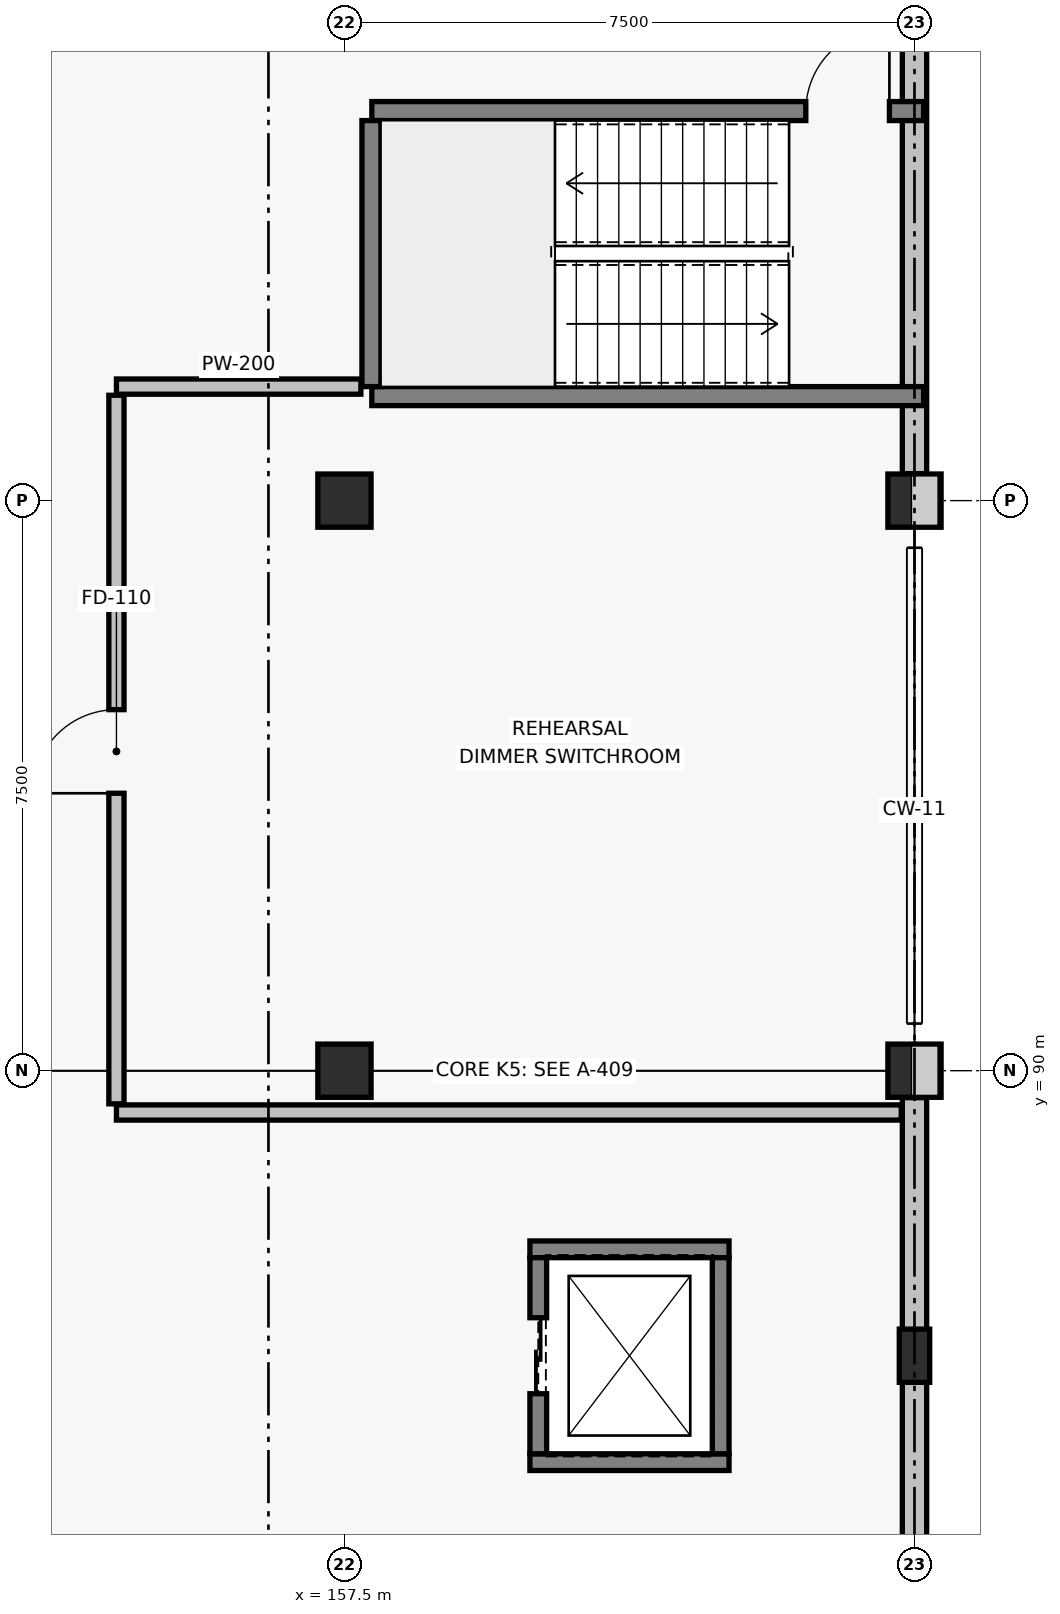
"""IFC4 building model, lengths in metres.
Left out: names, types, materials, properties, quantities, classifications, styles, units other than length and angle.
Written with IfcOpenShell. Run it as: python <this file> out.ifc"""

import sys

from ifc_helpers import new_model, si_unit, direction, frame, frame_2d, origin, origin_2d, place, context, subcontext, project, spatial, rectangle, extrude, element, fill, save


model = new_model("IFC4")
c1 = context("Model", 3, precision=1e-05, world=origin(), true_north=direction((0.0, 1.0)))
c2 = subcontext(c1, "Body", "Model", "MODEL_VIEW")
j1 = project(units=[si_unit("LENGTHUNIT", "METRE"), si_unit("PLANEANGLEUNIT", "RADIAN")], contexts=[c1])
p1 = place(None, origin())
s1 = spatial("IfcSite", under=j1, at=p1, CompositionType="ELEMENT")
p2 = place(p1, origin())
s2 = spatial("IfcBuilding", under=s1, at=p2, CompositionType="ELEMENT")
p3 = place(p2, frame((0.0, 0.0, 4.8)))
s3 = spatial("IfcBuildingStorey", under=s2, at=p3, CompositionType="ELEMENT", Elevation=4.8)
for number, where, z_axis, x_axis in (
    (1, (157.5, 90.0, 0.0), (0.0, 0.0, 1.0), (1.0, 0.0, 0.0)),
    (2, (157.5, 97.5, 0.0), (0.0, 0.0, 1.0), (1.0, 0.0, 0.0)),
    (3, (165.0, 90.0, 0.0), (0.0, 0.0, 1.0), (1.0, 0.0, 0.0)),
    (4, (165.0, 97.5, 0.0), (0.0, 0.0, 1.0), (1.0, 0.0, 0.0)),
):
    element("IfcColumn", number, at=place(p3, frame(where, z_axis=z_axis, x_axis=x_axis)), inside=s3, PredefinedType="COLUMN", context=c2, shape_type="SweptSolid", body=[
        extrude(rectangle(XDim=0.7, YDim=0.7, at=origin_2d()), origin(), (0.0, 0.0, 1.0), 4.2),
    ])
p4 = place(p3, frame((165.0, 86.25, 0.0), z_axis=(0.0, 0.0, 1.0), x_axis=(1.0, 0.0, 0.0)))
e5 = element("IfcColumn", 5, at=p4, inside=s3, PredefinedType="PILASTER", context=c2, shape_type="SweptSolid", body=[
    extrude(rectangle(XDim=0.4, YDim=0.7, at=origin_2d()), origin(), (0.0, 0.0, 1.0), 4.2),
])
p5 = place(p3, frame((165.0, 82.855, 0.0), z_axis=(0.0, 0.0, 1.0), x_axis=(0.0, 1.0, 0.0)))
e6 = element("IfcWall", 6, at=p5, inside=s3, PredefinedType="SOLIDWALL", context=c2, shape_type="SweptSolid", body=[
    extrude(rectangle(XDim=6.79, YDim=0.32, at=frame_2d((3.395, 0.0))), origin(), (0.0, 0.0, 1.0), 3.04),
])
p6 = place(p3, frame((165.0, 97.855, 0.0), z_axis=(0.0, 0.0, 1.0), x_axis=(0.0, 1.0, 0.0)))
e7 = element("IfcWall", 7, at=p6, inside=s3, PredefinedType="SOLIDWALL", context=c2, shape_type="SweptSolid", body=[
    extrude(rectangle(XDim=6.79, YDim=0.32, at=frame_2d((3.395, 0.0))), origin(), (0.0, 0.0, 1.0), 2.84),
])
p7 = place(p3, frame((157.86, 98.875, 0.0), z_axis=(0.0, 0.0, 1.0), x_axis=(1.0, 0.0, 0.0)))
e8 = element("IfcWall", 8, at=p7, inside=s3, PredefinedType="SOLIDWALL", context=c2, shape_type="SweptSolid", body=[
    extrude(rectangle(XDim=7.26, YDim=0.25, at=frame_2d((3.63, 0.0))), origin(), (0.0, 0.0, 1.0), 3.92),
])
p8 = place(p3, frame((157.86, 102.625, 0.0), z_axis=(0.0, 0.0, 1.0), x_axis=(1.0, 0.0, 0.0)))
e9 = element("IfcWall", 9, at=p8, inside=s3, PredefinedType="SOLIDWALL", context=c2, shape_type="SweptSolid", body=[
    extrude(rectangle(XDim=7.26, YDim=0.25, at=frame_2d((3.63, 0.0))), origin(), (0.0, 0.0, 1.0), 3.92),
])
p9 = place(p8, frame((5.71, 0.0, 0.0)))
e10 = element("IfcOpeningElement", 10, at=p9, cuts=e9, PredefinedType="OPENING", context=c2, shape_type="SweptSolid", body=[
    extrude(rectangle(XDim=1.1, YDim=2.15, at=frame_2d((0.55, 1.075))), frame((0.0, 0.135, 0.0), z_axis=(0.0, -1.0, 0.0), x_axis=(1.0, 0.0, 0.0)), (0.0, 0.0, 1.0), 0.27),
])
p10 = place(p3, frame((157.855, 99.0, 0.0), z_axis=(0.0, 0.0, 1.0), x_axis=(0.0, 1.0, 0.0)))
e11 = element("IfcWall", 11, at=p10, inside=s3, PredefinedType="SOLIDWALL", context=c2, shape_type="SweptSolid", body=[
    extrude(rectangle(XDim=3.5, YDim=0.25, at=frame_2d((1.75, 0.0))), origin(), (0.0, 0.0, 1.0), 3.92),
])
for number, where, z_axis, x_axis in (
    (12, (159.94, 84.85, 0.0), (0.0, 0.0, 1.0), (1.0, 0.0, 0.0)),
    (13, (159.94, 87.65, 0.0), (0.0, 0.0, 1.0), (1.0, 0.0, 0.0)),
):
    element("IfcWall", number, at=place(p3, frame(where, z_axis=z_axis, x_axis=x_axis)), inside=s3, PredefinedType="SOLIDWALL", context=c2, shape_type="SweptSolid", body=[
        extrude(rectangle(XDim=2.62, YDim=0.22, at=frame_2d((1.31, 0.0))), origin(), (0.0, 0.0, 1.0), 3.92),
    ])
p11 = place(p3, frame((160.05, 84.96, 0.0), z_axis=(0.0, 0.0, 1.0), x_axis=(0.0, 1.0, 0.0)))
e14 = element("IfcWall", 14, at=p11, inside=s3, PredefinedType="SOLIDWALL", context=c2, shape_type="SweptSolid", body=[
    extrude(rectangle(XDim=2.58, YDim=0.22, at=frame_2d((1.29, 0.0))), origin(), (0.0, 0.0, 1.0), 3.92),
])
p12 = place(p11, frame((0.79, 0.0, 0.0)))
e15 = element("IfcOpeningElement", 15, at=p12, cuts=e14, PredefinedType="OPENING", context=c2, shape_type="SweptSolid", body=[
    extrude(rectangle(XDim=1.0, YDim=2.15, at=frame_2d((0.5, 1.075))), frame((0.0, 0.12, 0.0), z_axis=(0.0, -1.0, 0.0), x_axis=(1.0, 0.0, 0.0)), (0.0, 0.0, 1.0), 0.24),
])
p13 = place(p3, frame((162.45, 84.96, 0.0), z_axis=(0.0, 0.0, 1.0), x_axis=(0.0, 1.0, 0.0)))
e16 = element("IfcWall", 16, at=p13, inside=s3, PredefinedType="SOLIDWALL", context=c2, shape_type="SweptSolid", body=[
    extrude(rectangle(XDim=2.58, YDim=0.22, at=frame_2d((1.29, 0.0))), origin(), (0.0, 0.0, 1.0), 3.92),
])
p14 = place(p3, frame((154.5, 89.45, 0.0), z_axis=(0.0, 0.0, 1.0), x_axis=(1.0, 0.0, 0.0)))
e17 = element("IfcWall", 17, at=p14, inside=s3, PredefinedType="PARTITIONING", context=c2, shape_type="SweptSolid", body=[
    extrude(rectangle(XDim=10.326, YDim=0.2, at=frame_2d((5.163, 0.0))), origin(), (0.0, 0.0, 1.0), 2.84),
])
p15 = place(p3, frame((154.5, 99.0, 0.0), z_axis=(0.0, 0.0, 1.0), x_axis=(1.0, 0.0, 0.0)))
e18 = element("IfcWall", 18, at=p15, inside=s3, PredefinedType="PARTITIONING", context=c2, shape_type="SweptSolid", body=[
    extrude(rectangle(XDim=3.216, YDim=0.2, at=frame_2d((1.608, 0.0))), origin(), (0.0, 0.0, 1.0), 3.27),
])
p16 = place(p3, frame((154.5, 89.564, 0.0), z_axis=(0.0, 0.0, 1.0), x_axis=(0.0, 1.0, 0.0)))
e19 = element("IfcWall", 19, at=p16, inside=s3, PredefinedType="PARTITIONING", context=c2, shape_type="SweptSolid", body=[
    extrude(rectangle(XDim=9.322, YDim=0.2, at=frame_2d((4.661, 0.0))), origin(), (0.0, 0.0, 1.0), 2.84),
])
p17 = place(p16, frame((4.086, 0.0, 0.0)))
e20 = element("IfcOpeningElement", 20, at=p17, cuts=e19, PredefinedType="OPENING", context=c2, shape_type="SweptSolid", body=[
    extrude(rectangle(XDim=1.1, YDim=2.15, at=frame_2d((0.55, 1.075))), frame((0.0, 0.11, 0.0), z_axis=(0.0, -1.0, 0.0), x_axis=(1.0, 0.0, 0.0)), (0.0, 0.0, 1.0), 0.22),
])
p18 = place(p9, origin())
e21 = element("IfcDoor", 21, at=p18, inside=s3, OperationType="SINGLE_SWING_RIGHT", PredefinedType="DOOR", context=c2, shape_type="SweptSolid", body=[
    extrude(rectangle(XDim=1.1, YDim=2.15, at=frame_2d((0.55, 1.075))), frame((0.0, 0.025, 0.0), z_axis=(0.0, -1.0, 0.0), x_axis=(1.0, 0.0, 0.0)), (0.0, 0.0, 1.0), 0.05),
])
fill(e10, e21)
p19 = place(p12, origin())
e22 = element("IfcDoor", 22, at=p19, inside=s3, OperationType="SLIDING_TO_LEFT", PredefinedType="DOOR", context=c2, shape_type="SweptSolid", body=[
    extrude(rectangle(XDim=1.0, YDim=2.15, at=frame_2d((0.5, 1.075))), frame((0.0, 0.025, 0.0), z_axis=(0.0, -1.0, 0.0), x_axis=(1.0, 0.0, 0.0)), (0.0, 0.0, 1.0), 0.05),
])
fill(e15, e22)
p20 = place(p17, origin())
e23 = element("IfcDoor", 23, at=p20, inside=s3, OperationType="SINGLE_SWING_LEFT", PredefinedType="DOOR", context=c2, shape_type="SweptSolid", body=[
    extrude(rectangle(XDim=1.1, YDim=2.15, at=frame_2d((0.55, 1.075))), frame((0.0, 0.025, 0.0), z_axis=(0.0, -1.0, 0.0), x_axis=(1.0, 0.0, 0.0)), (0.0, 0.0, 1.0), 0.05),
])
fill(e20, e23)
save(model, sys.argv[1])
